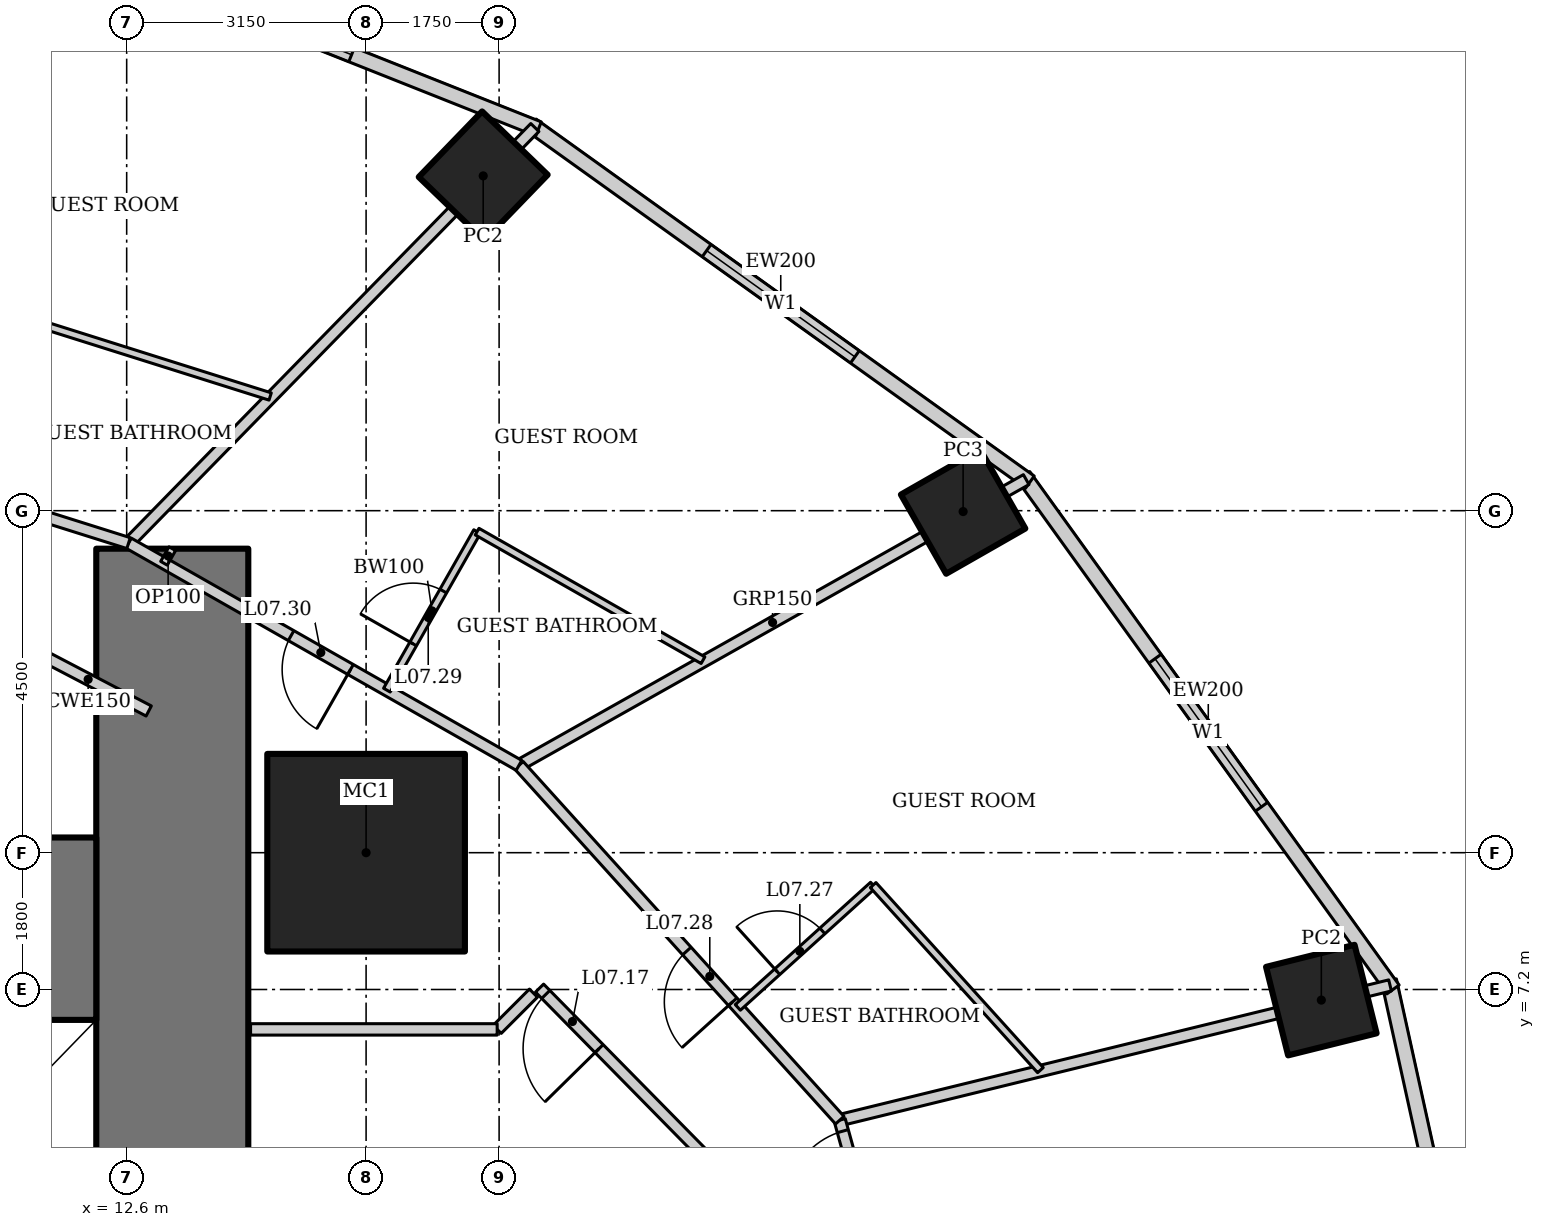
"""IFC4 building model, lengths in metres.
Left out: names, types, materials, properties, quantities, classifications, styles, units other than length and angle.
Written with IfcOpenShell. Run it as: python <this file> out.ifc"""

import sys

from ifc_helpers import new_model, si_unit, direction, frame, frame_2d, origin, origin_2d, place, context, subcontext, project, spatial, rectangle, hollow_rectangle, extrude, element, fill, save


model = new_model("IFC4")
c1 = context("Model", 3, precision=1e-05, world=origin(), true_north=direction((0.0, 1.0)))
c2 = subcontext(c1, "Body", "Model", "MODEL_VIEW")
j1 = project(units=[si_unit("LENGTHUNIT", "METRE"), si_unit("PLANEANGLEUNIT", "RADIAN")], contexts=[c1])
p1 = place(None, origin())
s1 = spatial("IfcSite", under=j1, at=p1, CompositionType="ELEMENT")
p2 = place(p1, origin())
s2 = spatial("IfcBuilding", under=s1, at=p2, CompositionType="ELEMENT")
p3 = place(p2, frame((0.0, 0.0, 40.6)))
s3 = spatial("IfcBuildingStorey", under=s2, at=p3, CompositionType="ELEMENT", Elevation=40.6)
p4 = place(p3, frame((15.75, 9.0, 0.0), z_axis=(0.0, 0.0, 1.0), x_axis=(1.0, 0.0, 0.0)))
e1 = element("IfcColumn", 1, at=p4, inside=s3, PredefinedType="COLUMN", context=c2, shape_type="SweptSolid", body=[
    extrude(hollow_rectangle(XDim=2.6, YDim=2.6, WallThickness=0.13, at=origin_2d()), origin(), (0.0, 0.0, 1.0), 3.6),
])
p5 = place(p3, frame((28.318, 7.06, 0.0), z_axis=(0.0, 0.0, 1.0), x_axis=(0.970295726276, 0.2419218956, 0.0)))
e2 = element("IfcColumn", 2, at=p5, inside=s3, PredefinedType="COLUMN", context=c2, shape_type="SweptSolid", body=[
    extrude(hollow_rectangle(XDim=1.2, YDim=1.2, WallThickness=0.1, at=origin_2d()), origin(), (0.0, 0.0, 1.0), 3.6),
])
p6 = place(p3, frame((23.605, 13.489, 0.0), z_axis=(0.0, 0.0, 1.0), x_axis=(0.86824298017, 0.496139221777, 0.0)))
e3 = element("IfcColumn", 3, at=p6, inside=s3, PredefinedType="COLUMN", context=c2, shape_type="SweptSolid", body=[
    extrude(hollow_rectangle(XDim=1.2, YDim=1.2, WallThickness=0.12, at=origin_2d()), origin(), (0.0, 0.0, 1.0), 3.6),
])
p7 = place(p3, frame((17.291, 17.905, 0.0), z_axis=(0.0, 0.0, 1.0), x_axis=(0.694658370459, 0.719339800339, 0.0)))
e4 = element("IfcColumn", 4, at=p7, inside=s3, PredefinedType="COLUMN", context=c2, shape_type="SweptSolid", body=[
    extrude(hollow_rectangle(XDim=1.2, YDim=1.2, WallThickness=0.1, at=origin_2d()), origin(), (0.0, 0.0, 1.0), 3.6),
])
p8 = place(p3, frame((13.2, -13.0, 0.0), z_axis=(0.0, 0.0, 1.0), x_axis=(0.0, 1.0, 0.0)))
e5 = element("IfcWall", 5, at=p8, inside=s3, PredefinedType="SHEAR", context=c2, shape_type="SweptSolid", body=[
    extrude(rectangle(XDim=26.0, YDim=2.0, at=frame_2d((13.0, 0.0))), origin(), (0.0, 0.0, 1.0), 3.6),
])
p9 = place(p8, frame((12.1, 0.0, 0.0)))
e6 = element("IfcOpeningElement", 6, at=p9, cuts=e5, PredefinedType="OPENING", context=c2, shape_type="SweptSolid", body=[
    extrude(rectangle(XDim=1.8, YDim=2.1, at=frame_2d((0.9, 1.05))), frame((0.0, 1.01, 0.0), z_axis=(0.0, -1.0, 0.0), x_axis=(1.0, 0.0, 0.0)), (0.0, 0.0, 1.0), 2.02),
])
p10 = place(p3, frame((12.2, 8.0, 0.0), z_axis=(0.0, 0.0, 1.0), x_axis=(-1.0, 0.0, 0.0)))
e7 = element("IfcWall", 7, at=p10, inside=s3, PredefinedType="SHEAR", context=c2, shape_type="SweptSolid", body=[
    extrude(rectangle(XDim=24.4, YDim=2.4, at=frame_2d((12.2, 0.0))), origin(), (0.0, 0.0, 1.0), 3.6),
])
p11 = place(p3, frame((30.835, -0.067, 0.0), z_axis=(0.0, 0.0, 1.0), x_axis=(-0.215238065514, 0.976561608478, 0.0)))
e8 = element("IfcWall", 8, at=p11, inside=s3, PredefinedType="SOLIDWALL", context=c2, shape_type="SweptSolid", body=[
    extrude(rectangle(XDim=7.562, YDim=0.2, at=frame_2d((3.781, 0.0))), origin(), (0.0, 0.0, 1.0), 3.45),
])
p12 = place(p11, frame((2.581, 0.0, 0.5)))
e9 = element("IfcOpeningElement", 9, at=p12, cuts=e8, PredefinedType="OPENING", context=c2, shape_type="SweptSolid", body=[
    extrude(rectangle(XDim=2.4, YDim=2.2, at=frame_2d((1.2, 1.1))), frame((0.0, 0.11, 0.0), z_axis=(0.0, -1.0, 0.0), x_axis=(1.0, 0.0, 0.0)), (0.0, 0.0, 1.0), 0.22),
])
p13 = place(p3, frame((29.26, 7.2, 0.0), z_axis=(0.0, 0.0, 1.0), x_axis=(-0.583937613703, 0.811798536155, 0.0)))
e10 = element("IfcWall", 10, at=p13, inside=s3, PredefinedType="SOLIDWALL", context=c2, shape_type="SweptSolid", body=[
    extrude(rectangle(XDim=8.323, YDim=0.2, at=frame_2d((4.162, 0.0))), origin(), (0.0, 0.0, 1.0), 3.45),
])
p14 = place(p13, frame((2.961, 0.0, 0.5)))
e11 = element("IfcOpeningElement", 11, at=p14, cuts=e10, PredefinedType="OPENING", context=c2, shape_type="SweptSolid", body=[
    extrude(rectangle(XDim=2.4, YDim=2.2, at=frame_2d((1.2, 1.1))), frame((0.0, 0.11, 0.0), z_axis=(0.0, -1.0, 0.0), x_axis=(1.0, 0.0, 0.0)), (0.0, 0.0, 1.0), 0.22),
])
p15 = place(p3, frame((24.482, 13.875, 0.0), z_axis=(0.0, 0.0, 1.0), x_axis=(-0.812791321576, 0.582554948112, 0.0)))
e12 = element("IfcWall", 12, at=p15, inside=s3, PredefinedType="SOLIDWALL", context=c2, shape_type="SweptSolid", body=[
    extrude(rectangle(XDim=8.063, YDim=0.2, at=frame_2d((4.032, 0.0))), origin(), (0.0, 0.0, 1.0), 3.45),
])
p16 = place(p15, frame((2.832, 0.0, 0.5)))
e13 = element("IfcOpeningElement", 13, at=p16, cuts=e12, PredefinedType="OPENING", context=c2, shape_type="SweptSolid", body=[
    extrude(rectangle(XDim=2.4, YDim=2.2, at=frame_2d((1.2, 1.1))), frame((0.0, 0.11, 0.0), z_axis=(0.0, -1.0, 0.0), x_axis=(1.0, 0.0, 0.0)), (0.0, 0.0, 1.0), 0.22),
])
p17 = place(p3, frame((18.018, 18.523, 0.0), z_axis=(0.0, 0.0, 1.0), x_axis=(-0.929358351251, 0.369178892895, 0.0)))
e14 = element("IfcWall", 14, at=p17, inside=s3, PredefinedType="SOLIDWALL", context=c2, shape_type="SweptSolid", body=[
    extrude(rectangle(XDim=7.692, YDim=0.2, at=frame_2d((3.846, 0.0))), origin(), (0.0, 0.0, 1.0), 3.45),
])
p18 = place(p17, frame((2.646, 0.0, 0.5)))
e15 = element("IfcOpeningElement", 15, at=p18, cuts=e14, PredefinedType="OPENING", context=c2, shape_type="SweptSolid", body=[
    extrude(rectangle(XDim=2.4, YDim=2.2, at=frame_2d((1.2, 1.1))), frame((0.0, 0.11, 0.0), z_axis=(0.0, -1.0, 0.0), x_axis=(1.0, 0.0, 0.0)), (0.0, 0.0, 1.0), 0.22),
])
p19 = place(p3, frame((29.222, 7.254, 0.0), z_axis=(0.0, 0.0, 1.0), x_axis=(-0.97130070913, -0.237854855832, 0.0)))
e16 = element("IfcWall", 16, at=p19, inside=s3, PredefinedType="PARTITIONING", context=c2, shape_type="SweptSolid", body=[
    extrude(rectangle(XDim=7.454, YDim=0.15, at=frame_2d((3.727, 0.0))), origin(), (0.0, 0.0, 1.0), 2.332),
])
p20 = place(p3, frame((24.435, 13.909, 0.0), z_axis=(0.0, 0.0, 1.0), x_axis=(-0.871267209855, -0.490808974074, 0.0)))
e17 = element("IfcWall", 17, at=p20, inside=s3, PredefinedType="PARTITIONING", context=c2, shape_type="SweptSolid", body=[
    extrude(rectangle(XDim=7.659, YDim=0.15, at=frame_2d((3.83, 0.0))), origin(), (0.0, 0.0, 1.0), 2.693),
])
p21 = place(p3, frame((17.97, 18.542, 0.0), z_axis=(0.0, 0.0, 1.0), x_axis=(-0.699032031211, -0.715090357467, 0.0)))
e18 = element("IfcWall", 18, at=p21, inside=s3, PredefinedType="PARTITIONING", context=c2, shape_type="SweptSolid", body=[
    extrude(rectangle(XDim=7.647, YDim=0.15, at=frame_2d((3.824, 0.0))), origin(), (0.0, 0.0, 1.0), 2.528),
])
p22 = place(p3, frame((23.5, 0.0, 0.0), z_axis=(0.0, 0.0, 1.0), x_axis=(-0.266933062421, 0.963715072097, 0.0)))
e19 = element("IfcWall", 19, at=p22, inside=s3, PredefinedType="PARTITIONING", context=c2, shape_type="SweptSolid", body=[
    extrude(rectangle(XDim=5.687, YDim=0.15, at=frame_2d((2.844, 0.0))), origin(), (0.0, 0.0, 1.0), 3.45),
])
p23 = place(p22, frame((4.537, 0.0, 0.0)))
e20 = element("IfcOpeningElement", 20, at=p23, cuts=e19, PredefinedType="OPENING", context=c2, shape_type="SweptSolid", body=[
    extrude(rectangle(XDim=1.0, YDim=2.1, at=frame_2d((0.5, 1.05))), frame((0.0, 0.085, 0.0), z_axis=(0.0, -1.0, 0.0), x_axis=(1.0, 0.0, 0.0)), (0.0, 0.0, 1.0), 0.17),
])
p24 = place(p3, frame((21.982, 5.481, 0.0), z_axis=(0.0, 0.0, 1.0), x_axis=(-0.670598380282, 0.741820606591, 0.0)))
e21 = element("IfcWall", 21, at=p24, inside=s3, PredefinedType="PARTITIONING", context=c2, shape_type="SweptSolid", body=[
    extrude(rectangle(XDim=6.293, YDim=0.15, at=frame_2d((3.147, 0.0))), origin(), (0.0, 0.0, 1.0), 3.45),
])
p25 = place(p24, frame((2.1, 0.0, 0.0)))
e22 = element("IfcOpeningElement", 22, at=p25, cuts=e21, PredefinedType="OPENING", context=c2, shape_type="SweptSolid", body=[
    extrude(rectangle(XDim=0.9, YDim=2.1, at=frame_2d((0.45, 1.05))), frame((0.0, 0.085, 0.0), z_axis=(0.0, -1.0, 0.0), x_axis=(1.0, 0.0, 0.0)), (0.0, 0.0, 1.0), 0.17),
])
p26 = place(p3, frame((17.761, 10.149, 0.0), z_axis=(0.0, 0.0, 1.0), x_axis=(-0.86907565943, 0.494679187136, 0.0)))
e23 = element("IfcWall", 23, at=p26, inside=s3, PredefinedType="PARTITIONING", context=c2, shape_type="SweptSolid", body=[
    extrude(rectangle(XDim=5.911, YDim=0.15, at=frame_2d((2.955, 0.0))), origin(), (0.0, 0.0, 1.0), 3.45),
])
p27 = place(p26, frame((2.55, 0.0, 0.0)))
e24 = element("IfcOpeningElement", 24, at=p27, cuts=e23, PredefinedType="OPENING", context=c2, shape_type="SweptSolid", body=[
    extrude(rectangle(XDim=0.9, YDim=2.1, at=frame_2d((0.45, 1.05))), frame((0.0, 0.085, 0.0), z_axis=(0.0, -1.0, 0.0), x_axis=(1.0, 0.0, 0.0)), (0.0, 0.0, 1.0), 0.17),
])
p28 = place(p3, frame((12.625, 13.073, 0.0), z_axis=(0.0, 0.0, 1.0), x_axis=(-0.953774229808, 0.30052407317, 0.0)))
e25 = element("IfcWall", 25, at=p28, inside=s3, PredefinedType="PARTITIONING", context=c2, shape_type="SweptSolid", body=[
    extrude(rectangle(XDim=5.388, YDim=0.15, at=frame_2d((2.694, 0.0))), origin(), (0.0, 0.0, 1.0), 3.45),
])
p29 = place(p28, frame((4.338, 0.0, 0.0)))
e26 = element("IfcOpeningElement", 26, at=p29, cuts=e25, PredefinedType="OPENING", context=c2, shape_type="SweptSolid", body=[
    extrude(rectangle(XDim=0.9, YDim=2.1, at=frame_2d((0.45, 1.05))), frame((0.0, 0.085, 0.0), z_axis=(0.0, -1.0, 0.0), x_axis=(1.0, 0.0, 0.0)), (0.0, 0.0, 1.0), 0.17),
])
p30 = place(p3, frame((20.641, 6.964, 0.0), z_axis=(0.0, 0.0, 1.0), x_axis=(0.741861025859, 0.670553665496, 0.0)))
e27 = element("IfcWall", 27, at=p30, inside=s3, PredefinedType="PARTITIONING", context=c2, shape_type="SweptSolid", body=[
    extrude(rectangle(XDim=2.4, YDim=0.1, at=frame_2d((1.2, 0.0))), origin(), (0.0, 0.0, 1.0), 3.45),
])
p31 = place(p30, frame((0.7, 0.0, 0.0)))
e28 = element("IfcOpeningElement", 28, at=p31, cuts=e27, PredefinedType="OPENING", context=c2, shape_type="SweptSolid", body=[
    extrude(rectangle(XDim=0.8, YDim=2.1, at=frame_2d((0.4, 1.05))), frame((0.0, 0.06, 0.0), z_axis=(0.0, -1.0, 0.0), x_axis=(1.0, 0.0, 0.0)), (0.0, 0.0, 1.0), 0.12),
])
p32 = place(p3, frame((22.421, 8.574, 0.0), z_axis=(0.0, 0.0, 1.0), x_axis=(0.670578246017, -0.741838807268, 0.0)))
e29 = element("IfcWall", 29, at=p32, inside=s3, PredefinedType="PARTITIONING", context=c2, shape_type="SweptSolid", body=[
    extrude(rectangle(XDim=3.282, YDim=0.1, at=frame_2d((1.641, 0.0))), origin(), (0.0, 0.0, 1.0), 3.45),
])
p33 = place(p3, frame((16.023, 11.139, 0.0), z_axis=(0.0, 0.0, 1.0), x_axis=(0.494659381266, 0.869086932663, 0.0)))
e30 = element("IfcWall", 30, at=p33, inside=s3, PredefinedType="PARTITIONING", context=c2, shape_type="SweptSolid", body=[
    extrude(rectangle(XDim=2.4, YDim=0.1, at=frame_2d((1.2, 0.0))), origin(), (0.0, 0.0, 1.0), 3.45),
])
p34 = place(p33, frame((0.7, 0.0, 0.0)))
e31 = element("IfcOpeningElement", 31, at=p34, cuts=e30, PredefinedType="OPENING", context=c2, shape_type="SweptSolid", body=[
    extrude(rectangle(XDim=0.8, YDim=2.1, at=frame_2d((0.4, 1.05))), frame((0.0, 0.06, 0.0), z_axis=(0.0, -1.0, 0.0), x_axis=(1.0, 0.0, 0.0)), (0.0, 0.0, 1.0), 0.12),
])
p35 = place(p3, frame((17.21, 13.225, 0.0), z_axis=(0.0, 0.0, 1.0), x_axis=(0.869041592831, -0.494739032147, 0.0)))
e32 = element("IfcWall", 32, at=p35, inside=s3, PredefinedType="PARTITIONING", context=c2, shape_type="SweptSolid", body=[
    extrude(rectangle(XDim=3.42, YDim=0.1, at=frame_2d((1.71, 0.0))), origin(), (0.0, 0.0, 1.0), 3.45),
])
p36 = place(p3, frame((11.438, 15.963, 0.0), z_axis=(0.0, 0.0, 1.0), x_axis=(0.953784420519, -0.300491728963, 0.0)))
e33 = element("IfcWall", 33, at=p36, inside=s3, PredefinedType="PARTITIONING", context=c2, shape_type="SweptSolid", body=[
    extrude(rectangle(XDim=3.197, YDim=0.1, at=frame_2d((1.599, 0.0))), origin(), (0.0, 0.0, 1.0), 3.45),
])
p37 = place(p3, frame((13.2, 13.0, 0.0), z_axis=(0.0, 0.0, 1.0), x_axis=(-0.49435138335, -0.869262164011, 0.0)))
e34 = element("IfcWall", 34, at=p37, inside=s3, PredefinedType="PARTITIONING", context=c2, shape_type="SweptSolid", body=[
    extrude(rectangle(XDim=0.221, YDim=0.1, at=frame_2d((0.11, 0.0))), origin(), (0.0, 0.0, 1.0), 3.45),
])
p38 = place(p3, frame((20.183, 5.032, 0.0), z_axis=(0.0, 0.0, 1.0), x_axis=(-0.701392176983, 0.712775570616, 0.0)))
e35 = element("IfcWall", 35, at=p38, inside=s3, PredefinedType="PARTITIONING", context=c2, shape_type="SweptSolid", body=[
    extrude(rectangle(XDim=3.067, YDim=0.15, at=frame_2d((1.533, 0.0))), origin(), (0.0, 0.0, 1.0), 3.45),
])
p39 = place(p38, frame((1.95, 0.0, 0.0)))
e36 = element("IfcOpeningElement", 36, at=p39, cuts=e35, PredefinedType="OPENING", context=c2, shape_type="SweptSolid", body=[
    extrude(rectangle(XDim=1.0, YDim=2.1, at=frame_2d((0.5, 1.05))), frame((0.0, 0.085, 0.0), z_axis=(0.0, -1.0, 0.0), x_axis=(1.0, 0.0, 0.0)), (0.0, 0.0, 1.0), 0.17),
])
p40 = place(p3, frame((12.89, 10.865, 0.0), z_axis=(0.0, 0.0, 1.0), x_axis=(-0.886301440762, 0.463108795104, 0.0)))
e37 = element("IfcWall", 37, at=p40, inside=s3, PredefinedType="PARTITIONING", context=c2, shape_type="SweptSolid", body=[
    extrude(rectangle(XDim=1.798, YDim=0.15, at=frame_2d((0.899, 0.0))), origin(), (0.0, 0.0, 1.0), 3.45),
])
p41 = place(p3, frame((17.952, 7.152, 0.0), z_axis=(0.0, 0.0, 1.0), x_axis=(-0.707106781187, -0.707106781187, 0.0)))
e38 = element("IfcWall", 38, at=p41, inside=s3, PredefinedType="PARTITIONING", context=c2, shape_type="SweptSolid", body=[
    extrude(rectangle(XDim=0.675, YDim=0.15, at=frame_2d((0.337, 0.0))), origin(), (0.0, 0.0, 1.0), 3.45),
])
p42 = place(p3, frame((17.475, 6.675, 0.0), z_axis=(0.0, 0.0, 1.0), x_axis=(-1.0, 0.0, 0.0)))
e39 = element("IfcWall", 39, at=p42, inside=s3, PredefinedType="PARTITIONING", context=c2, shape_type="SweptSolid", body=[
    extrude(rectangle(XDim=3.245, YDim=0.15, at=frame_2d((1.622, 0.0))), origin(), (0.0, 0.0, 1.0), 3.45),
])
p43 = place(p14, origin())
e40 = element("IfcWindow", 40, at=p43, inside=s3, PartitioningType="SINGLE_PANEL", PredefinedType="WINDOW", context=c2, shape_type="SweptSolid", body=[
    extrude(rectangle(XDim=2.4, YDim=2.2, at=frame_2d((1.2, 1.1))), frame((0.0, 0.03, 0.0), z_axis=(0.0, -1.0, 0.0), x_axis=(1.0, 0.0, 0.0)), (0.0, 0.0, 1.0), 0.06),
])
fill(e11, e40)
p44 = place(p16, origin())
e41 = element("IfcWindow", 41, at=p44, inside=s3, PartitioningType="SINGLE_PANEL", PredefinedType="WINDOW", context=c2, shape_type="SweptSolid", body=[
    extrude(rectangle(XDim=2.4, YDim=2.2, at=frame_2d((1.2, 1.1))), frame((0.0, 0.03, 0.0), z_axis=(0.0, -1.0, 0.0), x_axis=(1.0, 0.0, 0.0)), (0.0, 0.0, 1.0), 0.06),
])
fill(e13, e41)
p45 = place(p18, origin())
e42 = element("IfcWindow", 42, at=p45, inside=s3, PartitioningType="SINGLE_PANEL", PredefinedType="WINDOW", context=c2, shape_type="SweptSolid", body=[
    extrude(rectangle(XDim=2.4, YDim=2.2, at=frame_2d((1.2, 1.1))), frame((0.0, 0.03, 0.0), z_axis=(0.0, -1.0, 0.0), x_axis=(1.0, 0.0, 0.0)), (0.0, 0.0, 1.0), 0.06),
])
fill(e15, e42)
p46 = place(p39, origin())
e43 = element("IfcDoor", 43, at=p46, inside=s3, OperationType="SINGLE_SWING_LEFT", PredefinedType="DOOR", context=c2, shape_type="SweptSolid", body=[
    extrude(rectangle(XDim=1.0, YDim=2.1, at=frame_2d((0.5, 1.05))), frame((0.0, 0.025, 0.0), z_axis=(0.0, -1.0, 0.0), x_axis=(1.0, 0.0, 0.0)), (0.0, 0.0, 1.0), 0.05),
])
fill(e36, e43)
p47 = place(p23, origin())
e44 = element("IfcDoor", 44, at=p47, inside=s3, OperationType="SINGLE_SWING_LEFT", PredefinedType="DOOR", context=c2, shape_type="SweptSolid", body=[
    extrude(rectangle(XDim=1.0, YDim=2.1, at=frame_2d((0.5, 1.05))), frame((0.0, 0.025, 0.0), z_axis=(0.0, -1.0, 0.0), x_axis=(1.0, 0.0, 0.0)), (0.0, 0.0, 1.0), 0.05),
])
fill(e20, e44)
p48 = place(p31, origin())
e45 = element("IfcDoor", 45, at=p48, inside=s3, OperationType="SINGLE_SWING_LEFT", PredefinedType="DOOR", context=c2, shape_type="SweptSolid", body=[
    extrude(rectangle(XDim=0.8, YDim=2.1, at=frame_2d((0.4, 1.05))), frame((0.0, 0.025, 0.0), z_axis=(0.0, -1.0, 0.0), x_axis=(1.0, 0.0, 0.0)), (0.0, 0.0, 1.0), 0.05),
])
fill(e28, e45)
p49 = place(p25, origin())
e46 = element("IfcDoor", 46, at=p49, inside=s3, OperationType="SINGLE_SWING_LEFT", PredefinedType="DOOR", context=c2, shape_type="SweptSolid", body=[
    extrude(rectangle(XDim=0.9, YDim=2.1, at=frame_2d((0.45, 1.05))), frame((0.0, 0.025, 0.0), z_axis=(0.0, -1.0, 0.0), x_axis=(1.0, 0.0, 0.0)), (0.0, 0.0, 1.0), 0.05),
])
fill(e22, e46)
p50 = place(p34, origin())
e47 = element("IfcDoor", 47, at=p50, inside=s3, OperationType="SINGLE_SWING_LEFT", PredefinedType="DOOR", context=c2, shape_type="SweptSolid", body=[
    extrude(rectangle(XDim=0.8, YDim=2.1, at=frame_2d((0.4, 1.05))), frame((0.0, 0.025, 0.0), z_axis=(0.0, -1.0, 0.0), x_axis=(1.0, 0.0, 0.0)), (0.0, 0.0, 1.0), 0.05),
])
fill(e31, e47)
p51 = place(p27, origin())
e48 = element("IfcDoor", 48, at=p51, inside=s3, OperationType="SINGLE_SWING_LEFT", PredefinedType="DOOR", context=c2, shape_type="SweptSolid", body=[
    extrude(rectangle(XDim=0.9, YDim=2.1, at=frame_2d((0.45, 1.05))), frame((0.0, 0.025, 0.0), z_axis=(0.0, -1.0, 0.0), x_axis=(1.0, 0.0, 0.0)), (0.0, 0.0, 1.0), 0.05),
])
fill(e24, e48)
save(model, sys.argv[1])
